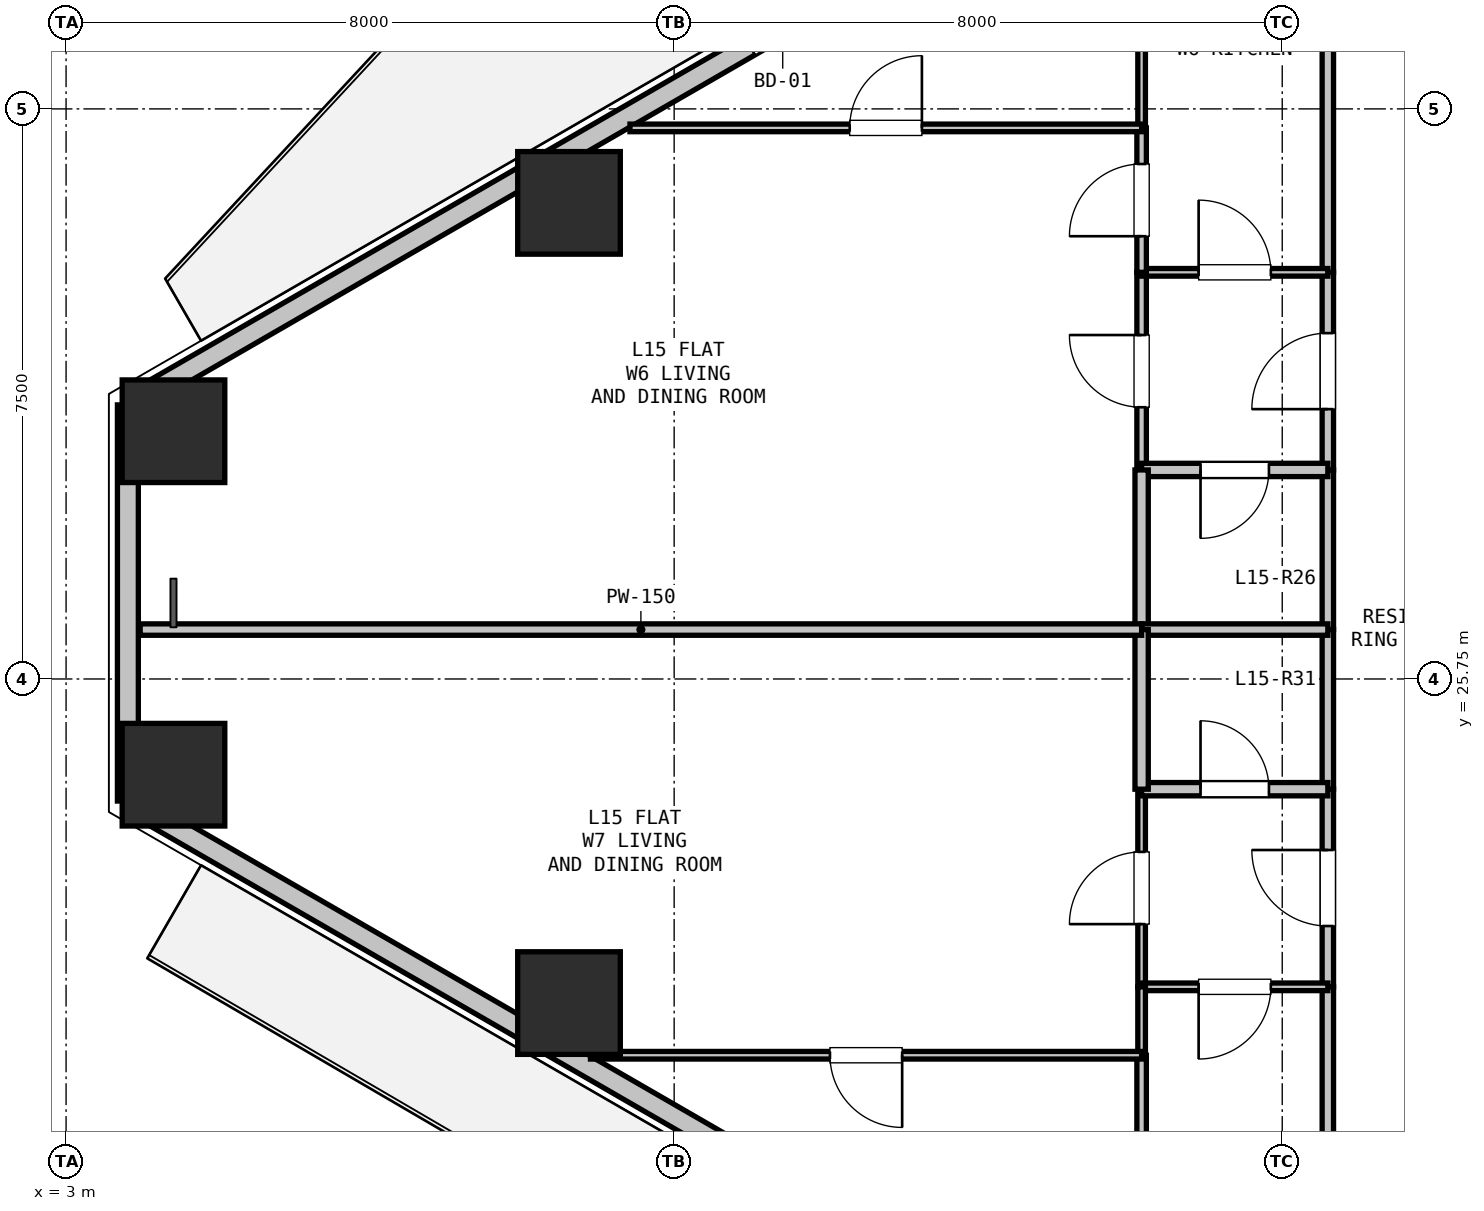
"""IFC4 building model, lengths in metres.
Left out: names, types, materials, properties, quantities, classifications, styles, units other than length and angle.
Written with IfcOpenShell. Run it as: python <this file> out.ifc"""

import sys

from ifc_helpers import new_model, si_unit, direction, frame, frame_2d, origin, origin_2d, place, context, subcontext, project, spatial, rectangle, hollow_rectangle, extrude, element, fill, save


model = new_model("IFC4")
c1 = context("Model", 3, precision=1e-05, world=origin(), true_north=direction((0.0, 1.0)))
c2 = subcontext(c1, "Body", "Model", "MODEL_VIEW")
j1 = project(units=[si_unit("LENGTHUNIT", "METRE"), si_unit("PLANEANGLEUNIT", "RADIAN")], contexts=[c1])
p1 = place(None, origin())
s1 = spatial("IfcSite", under=j1, at=p1, CompositionType="ELEMENT")
p2 = place(p1, origin())
s2 = spatial("IfcBuilding", under=s1, at=p2, CompositionType="ELEMENT")
p3 = place(p2, frame((0.0, 0.0, 55.5)))
s3 = spatial("IfcBuildingStorey", under=s2, at=p3, CompositionType="ELEMENT", Elevation=55.5)
for number, where, z_axis, x_axis in (
    (1, (4.413, 29.009, 0.0), (0.0, 0.0, 1.0), (1.0, 0.0, 0.0)),
    (2, (9.617, 32.014, 0.0), (0.0, 0.0, 1.0), (1.0, 0.0, 0.0)),
    (3, (9.617, 21.486, 0.0), (0.0, 0.0, 1.0), (1.0, 0.0, 0.0)),
    (4, (4.413, 24.491, 0.0), (0.0, 0.0, 1.0), (1.0, 0.0, 0.0)),
):
    element("IfcColumn", number, at=place(p3, frame(where, z_axis=z_axis, x_axis=x_axis)), inside=s3, PredefinedType="COLUMN", context=c2, shape_type="SweptSolid", body=[
        extrude(hollow_rectangle(XDim=1.35, YDim=1.35, WallThickness=0.036, at=origin_2d()), origin(), (0.0, 0.0, 1.0), 3.3),
    ])
p4 = place(p3, frame((3.813, 24.144, 0.0), z_axis=(0.0, 0.0, 1.0), x_axis=(0.0, 1.0, 0.0)))
e5 = element("IfcWall", 5, at=p4, inside=s3, PredefinedType="SOLIDWALL", context=c2, shape_type="SweptSolid", body=[
    extrude(rectangle(XDim=5.211, YDim=0.275, at=frame_2d((2.606, 0.0))), origin(), (0.0, 0.0, 1.0), 2.66),
])
p5 = place(p3, frame((3.943, 29.431, 0.0), z_axis=(0.0, 0.0, 1.0), x_axis=(0.866027105532, 0.499997052475, 0.0)))
e6 = element("IfcWall", 6, at=p5, inside=s3, PredefinedType="SOLIDWALL", context=c2, shape_type="SweptSolid", body=[
    extrude(rectangle(XDim=12.673, YDim=0.275, at=frame_2d((6.336, 0.0))), origin(), (0.0, 0.0, 1.0), 2.66),
])
p6 = place(p5, frame((9.298, 0.0, 0.0)))
e7 = element("IfcOpeningElement", 7, at=p6, cuts=e6, PredefinedType="OPENING", context=c2, shape_type="SweptSolid", body=[
    extrude(rectangle(XDim=1.0, YDim=2.1, at=frame_2d((0.5, 1.05))), frame((0.0, 0.147, 0.0), z_axis=(0.0, -1.0, 0.0), x_axis=(1.0, 0.0, 0.0)), (0.0, 0.0, 1.0), 0.295),
])
p7 = place(p3, frame((14.918, 17.733, 0.0), z_axis=(0.0, 0.0, 1.0), x_axis=(-0.866027105532, 0.499997052475, 0.0)))
e8 = element("IfcWall", 8, at=p7, inside=s3, PredefinedType="SOLIDWALL", context=c2, shape_type="SweptSolid", body=[
    extrude(rectangle(XDim=12.673, YDim=0.275, at=frame_2d((6.336, 0.0))), origin(), (0.0, 0.0, 1.0), 2.66),
])
p8 = place(p7, frame((2.216, 0.0, 0.9)))
e9 = element("IfcOpeningElement", 9, at=p8, cuts=e8, PredefinedType="OPENING", context=c2, shape_type="SweptSolid", body=[
    extrude(rectangle(XDim=1.2, YDim=1.4, at=frame_2d((0.6, 0.7))), frame((0.0, 0.147, 0.0), z_axis=(0.0, -1.0, 0.0), x_axis=(1.0, 0.0, 0.0)), (0.0, 0.0, 1.0), 0.295),
])
p9 = place(p3, frame((19.6, 18.15, 0.0), z_axis=(0.0, 0.0, 1.0), x_axis=(0.0, 1.0, 0.0)))
e10 = element("IfcWall", 10, at=p9, inside=s3, PredefinedType="PARTITIONING", context=c2, shape_type="SweptSolid", body=[
    extrude(rectangle(XDim=3.55, YDim=0.15, at=frame_2d((1.775, 0.0))), origin(), (0.0, 0.0, 1.0), 2.337),
])
p10 = place(p3, frame((19.6, 21.7, 0.0), z_axis=(0.0, 0.0, 1.0), x_axis=(0.0, 1.0, 0.0)))
e11 = element("IfcWall", 11, at=p10, inside=s3, PredefinedType="PARTITIONING", context=c2, shape_type="SweptSolid", body=[
    extrude(rectangle(XDim=2.6, YDim=0.15, at=frame_2d((1.3, 0.0))), origin(), (0.0, 0.0, 1.0), 3.04),
])
p11 = place(p10, frame((0.8, 0.0, 0.0)))
e12 = element("IfcOpeningElement", 12, at=p11, cuts=e11, PredefinedType="OPENING", context=c2, shape_type="SweptSolid", body=[
    extrude(rectangle(XDim=1.0, YDim=2.15, at=frame_2d((0.5, 1.075))), frame((0.0, 0.085, 0.0), z_axis=(0.0, -1.0, 0.0), x_axis=(1.0, 0.0, 0.0)), (0.0, 0.0, 1.0), 0.17),
])
p12 = place(p3, frame((19.6, 24.3, 0.0), z_axis=(0.0, 0.0, 1.0), x_axis=(0.0, 1.0, 0.0)))
e13 = element("IfcWall", 13, at=p12, inside=s3, PredefinedType="PARTITIONING", context=c2, shape_type="SweptSolid", body=[
    extrude(rectangle(XDim=2.1, YDim=0.15, at=frame_2d((1.05, 0.0))), origin(), (0.0, 0.0, 1.0), 3.04),
])
p13 = place(p3, frame((19.6, 26.4, 0.0), z_axis=(0.0, 0.0, 1.0), x_axis=(0.0, 1.0, 0.0)))
e14 = element("IfcWall", 14, at=p13, inside=s3, PredefinedType="PARTITIONING", context=c2, shape_type="SweptSolid", body=[
    extrude(rectangle(XDim=2.1, YDim=0.15, at=frame_2d((1.05, 0.0))), origin(), (0.0, 0.0, 1.0), 3.04),
])
p14 = place(p3, frame((19.6, 28.5, 0.0), z_axis=(0.0, 0.0, 1.0), x_axis=(0.0, 1.0, 0.0)))
e15 = element("IfcWall", 15, at=p14, inside=s3, PredefinedType="PARTITIONING", context=c2, shape_type="SweptSolid", body=[
    extrude(rectangle(XDim=2.6, YDim=0.15, at=frame_2d((1.3, 0.0))), origin(), (0.0, 0.0, 1.0), 3.04),
])
p15 = place(p14, frame((0.8, 0.0, 0.0)))
e16 = element("IfcOpeningElement", 16, at=p15, cuts=e15, PredefinedType="OPENING", context=c2, shape_type="SweptSolid", body=[
    extrude(rectangle(XDim=1.0, YDim=2.15, at=frame_2d((0.5, 1.075))), frame((0.0, 0.085, 0.0), z_axis=(0.0, -1.0, 0.0), x_axis=(1.0, 0.0, 0.0)), (0.0, 0.0, 1.0), 0.17),
])
p16 = place(p3, frame((19.6, 31.1, 0.0), z_axis=(0.0, 0.0, 1.0), x_axis=(0.0, 1.0, 0.0)))
e17 = element("IfcWall", 17, at=p16, inside=s3, PredefinedType="PARTITIONING", context=c2, shape_type="SweptSolid", body=[
    extrude(rectangle(XDim=4.25, YDim=0.15, at=frame_2d((2.125, 0.0))), origin(), (0.0, 0.0, 1.0), 2.337),
])
p17 = place(p3, frame((17.15, 28.5, 0.0), z_axis=(0.0, 0.0, 1.0), x_axis=(0.0, 1.0, 0.0)))
e18 = element("IfcWall", 18, at=p17, inside=s3, PredefinedType="PARTITIONING", context=c2, shape_type="SweptSolid", body=[
    extrude(rectangle(XDim=2.6, YDim=0.125, at=frame_2d((1.3, 0.0))), origin(), (0.0, 0.0, 1.0), 3.04),
])
p18 = place(p17, frame((0.825, 0.0, 0.0)))
e19 = element("IfcOpeningElement", 19, at=p18, cuts=e18, PredefinedType="OPENING", context=c2, shape_type="SweptSolid", body=[
    extrude(rectangle(XDim=0.95, YDim=2.1, at=frame_2d((0.475, 1.05))), frame((0.0, 0.073, 0.0), z_axis=(0.0, -1.0, 0.0), x_axis=(1.0, 0.0, 0.0)), (0.0, 0.0, 1.0), 0.145),
])
p19 = place(p3, frame((17.15, 31.1, 0.0), z_axis=(0.0, 0.0, 1.0), x_axis=(1.0, 0.0, 0.0)))
e20 = element("IfcWall", 20, at=p19, inside=s3, PredefinedType="PARTITIONING", context=c2, shape_type="SweptSolid", body=[
    extrude(rectangle(XDim=2.45, YDim=0.1, at=frame_2d((1.225, 0.0))), origin(), (0.0, 0.0, 1.0), 3.04),
])
p20 = place(p19, frame((0.75, 0.0, 0.0)))
e21 = element("IfcOpeningElement", 21, at=p20, cuts=e20, PredefinedType="OPENING", context=c2, shape_type="SweptSolid", body=[
    extrude(rectangle(XDim=0.95, YDim=2.1, at=frame_2d((0.475, 1.05))), frame((0.0, 0.06, 0.0), z_axis=(0.0, -1.0, 0.0), x_axis=(1.0, 0.0, 0.0)), (0.0, 0.0, 1.0), 0.12),
])
p21 = place(p3, frame((19.6, 28.5, 0.0), z_axis=(0.0, 0.0, 1.0), x_axis=(-1.0, 0.0, 0.0)))
e22 = element("IfcWall", 22, at=p21, inside=s3, PredefinedType="PLUMBINGWALL", context=c2, shape_type="SweptSolid", body=[
    extrude(rectangle(XDim=2.45, YDim=0.175, at=frame_2d((1.225, 0.0))), origin(), (0.0, 0.0, 1.0), 3.04),
])
p22 = place(p21, frame((0.775, 0.0, 0.0)))
e23 = element("IfcOpeningElement", 23, at=p22, cuts=e22, PredefinedType="OPENING", context=c2, shape_type="SweptSolid", body=[
    extrude(rectangle(XDim=0.9, YDim=2.1, at=frame_2d((0.45, 1.05))), frame((0.0, 0.097, 0.0), z_axis=(0.0, -1.0, 0.0), x_axis=(1.0, 0.0, 0.0)), (0.0, 0.0, 1.0), 0.195),
])
p23 = place(p3, frame((17.15, 21.7, 0.0), z_axis=(0.0, 0.0, 1.0), x_axis=(0.0, 1.0, 0.0)))
e24 = element("IfcWall", 24, at=p23, inside=s3, PredefinedType="PARTITIONING", context=c2, shape_type="SweptSolid", body=[
    extrude(rectangle(XDim=2.6, YDim=0.1, at=frame_2d((1.3, 0.0))), origin(), (0.0, 0.0, 1.0), 3.04),
])
p24 = place(p23, frame((0.825, 0.0, 0.0)))
e25 = element("IfcOpeningElement", 25, at=p24, cuts=e24, PredefinedType="OPENING", context=c2, shape_type="SweptSolid", body=[
    extrude(rectangle(XDim=0.95, YDim=2.1, at=frame_2d((0.475, 1.05))), frame((0.0, 0.06, 0.0), z_axis=(0.0, -1.0, 0.0), x_axis=(1.0, 0.0, 0.0)), (0.0, 0.0, 1.0), 0.12),
])
p25 = place(p3, frame((17.15, 24.3, 0.0), z_axis=(0.0, 0.0, 1.0), x_axis=(1.0, 0.0, 0.0)))
e26 = element("IfcWall", 26, at=p25, inside=s3, PredefinedType="PLUMBINGWALL", context=c2, shape_type="SweptSolid", body=[
    extrude(rectangle(XDim=2.45, YDim=0.175, at=frame_2d((1.225, 0.0))), origin(), (0.0, 0.0, 1.0), 3.04),
])
p26 = place(p25, frame((0.775, 0.0, 0.0)))
e27 = element("IfcOpeningElement", 27, at=p26, cuts=e26, PredefinedType="OPENING", context=c2, shape_type="SweptSolid", body=[
    extrude(rectangle(XDim=0.9, YDim=2.1, at=frame_2d((0.45, 1.05))), frame((0.0, 0.097, 0.0), z_axis=(0.0, -1.0, 0.0), x_axis=(1.0, 0.0, 0.0)), (0.0, 0.0, 1.0), 0.195),
])
p27 = place(p3, frame((19.6, 21.7, 0.0), z_axis=(0.0, 0.0, 1.0), x_axis=(-1.0, 0.0, 0.0)))
e28 = element("IfcWall", 28, at=p27, inside=s3, PredefinedType="PARTITIONING", context=c2, shape_type="SweptSolid", body=[
    extrude(rectangle(XDim=2.45, YDim=0.1, at=frame_2d((1.225, 0.0))), origin(), (0.0, 0.0, 1.0), 2.337),
])
p28 = place(p27, frame((0.75, 0.0, 0.0)))
e29 = element("IfcOpeningElement", 29, at=p28, cuts=e28, PredefinedType="OPENING", context=c2, shape_type="SweptSolid", body=[
    extrude(rectangle(XDim=0.95, YDim=2.1, at=frame_2d((0.475, 1.05))), frame((0.0, 0.06, 0.0), z_axis=(0.0, -1.0, 0.0), x_axis=(1.0, 0.0, 0.0)), (0.0, 0.0, 1.0), 0.12),
])
p29 = place(p3, frame((17.15, 26.4, 0.0), z_axis=(0.0, 0.0, 1.0), x_axis=(0.0, 1.0, 0.0)))
e30 = element("IfcWall", 30, at=p29, inside=s3, PredefinedType="PLUMBINGWALL", context=c2, shape_type="SweptSolid", body=[
    extrude(rectangle(XDim=2.1, YDim=0.175, at=frame_2d((1.05, 0.0))), origin(), (0.0, 0.0, 1.0), 3.04),
])
p30 = place(p3, frame((19.6, 26.4, 0.0), z_axis=(0.0, 0.0, 1.0), x_axis=(-1.0, 0.0, 0.0)))
e31 = element("IfcWall", 31, at=p30, inside=s3, PredefinedType="PARTITIONING", context=c2, shape_type="SweptSolid", body=[
    extrude(rectangle(XDim=2.45, YDim=0.15, at=frame_2d((1.225, 0.0))), origin(), (0.0, 0.0, 1.0), 3.04),
])
p31 = place(p3, frame((17.15, 31.1, 0.0), z_axis=(0.0, 0.0, 1.0), x_axis=(0.0, 1.0, 0.0)))
e32 = element("IfcWall", 32, at=p31, inside=s3, PredefinedType="PARTITIONING", context=c2, shape_type="SweptSolid", body=[
    extrude(rectangle(XDim=1.9, YDim=0.125, at=frame_2d((0.95, 0.0))), origin(), (0.0, 0.0, 1.0), 2.337),
])
p32 = place(p31, frame((0.475, 0.0, 0.0)))
e33 = element("IfcOpeningElement", 33, at=p32, cuts=e32, PredefinedType="OPENING", context=c2, shape_type="SweptSolid", body=[
    extrude(rectangle(XDim=0.95, YDim=2.1, at=frame_2d((0.475, 1.05))), frame((0.0, 0.073, 0.0), z_axis=(0.0, -1.0, 0.0), x_axis=(1.0, 0.0, 0.0)), (0.0, 0.0, 1.0), 0.145),
])
p33 = place(p3, frame((17.15, 33.0, 0.0), z_axis=(0.0, 0.0, 1.0), x_axis=(0.0, 1.0, 0.0)))
e34 = element("IfcWall", 34, at=p33, inside=s3, PredefinedType="PARTITIONING", context=c2, shape_type="SweptSolid", body=[
    extrude(rectangle(XDim=2.35, YDim=0.1, at=frame_2d((1.175, 0.0))), origin(), (0.0, 0.0, 1.0), 3.04),
])
p34 = place(p3, frame((17.15, 24.3, 0.0), z_axis=(0.0, 0.0, 1.0), x_axis=(0.0, 1.0, 0.0)))
e35 = element("IfcWall", 35, at=p34, inside=s3, PredefinedType="PLUMBINGWALL", context=c2, shape_type="SweptSolid", body=[
    extrude(rectangle(XDim=2.1, YDim=0.175, at=frame_2d((1.05, 0.0))), origin(), (0.0, 0.0, 1.0), 3.04),
])
p35 = place(p3, frame((17.15, 18.15, 0.0), z_axis=(0.0, 0.0, 1.0), x_axis=(0.0, 1.0, 0.0)))
e36 = element("IfcWall", 36, at=p35, inside=s3, PredefinedType="PARTITIONING", context=c2, shape_type="SweptSolid", body=[
    extrude(rectangle(XDim=2.65, YDim=0.125, at=frame_2d((1.325, 0.0))), origin(), (0.0, 0.0, 1.0), 3.04),
])
p36 = place(p3, frame((17.15, 20.8, 0.0), z_axis=(0.0, 0.0, 1.0), x_axis=(0.0, 1.0, 0.0)))
e37 = element("IfcWall", 37, at=p36, inside=s3, PredefinedType="PARTITIONING", context=c2, shape_type="SweptSolid", body=[
    extrude(rectangle(XDim=0.9, YDim=0.1, at=frame_2d((0.45, 0.0))), origin(), (0.0, 0.0, 1.0), 2.337),
])
p37 = place(p3, frame((10.419, 33.0, 0.0), z_axis=(0.0, 0.0, 1.0), x_axis=(1.0, 0.0, 0.0)))
e38 = element("IfcWall", 38, at=p37, inside=s3, PredefinedType="PARTITIONING", context=c2, shape_type="SweptSolid", body=[
    extrude(rectangle(XDim=6.731, YDim=0.1, at=frame_2d((3.365, 0.0))), origin(), (0.0, 0.0, 1.0), 2.365),
])
p38 = place(p37, frame((2.89, 0.0, 0.0)))
e39 = element("IfcOpeningElement", 39, at=p38, cuts=e38, PredefinedType="OPENING", context=c2, shape_type="SweptSolid", body=[
    extrude(rectangle(XDim=0.95, YDim=2.1, at=frame_2d((0.475, 1.05))), frame((0.0, 0.06, 0.0), z_axis=(0.0, -1.0, 0.0), x_axis=(1.0, 0.0, 0.0)), (0.0, 0.0, 1.0), 0.12),
])
p39 = place(p3, frame((17.15, 26.4, 0.0), z_axis=(0.0, 0.0, 1.0), x_axis=(-1.0, 0.0, 0.0)))
e40 = element("IfcWall", 40, at=p39, inside=s3, PredefinedType="PARTITIONING", context=c2, shape_type="SweptSolid", body=[
    extrude(rectangle(XDim=13.175, YDim=0.15, at=frame_2d((6.588, 0.0))), origin(), (0.0, 0.0, 1.0), 2.65),
])
p40 = place(p3, frame((3.813, 29.356, 0.0), z_axis=(0.0, 0.0, 1.0), x_axis=(0.866131372301, 0.499816412211, 0.0)))
e41 = element("IfcWall", 41, at=p40, inside=s3, PredefinedType="PARTITIONING", context=c2, shape_type="SweptSolid", body=[
    extrude(rectangle(XDim=0.15, YDim=0.1, at=frame_2d((0.075, 0.0))), origin(), (0.0, 0.0, 1.0), 3.04),
])
p41 = place(p3, frame((17.15, 20.8, 0.0), z_axis=(0.0, 0.0, 1.0), x_axis=(-1.0, 0.0, 0.0)))
e42 = element("IfcWall", 42, at=p41, inside=s3, PredefinedType="PARTITIONING", context=c2, shape_type="SweptSolid", body=[
    extrude(rectangle(XDim=7.25, YDim=0.1, at=frame_2d((3.625, 0.0))), origin(), (0.0, 0.0, 1.0), 2.365),
])
p42 = place(p41, frame((3.15, 0.0, 0.0)))
e43 = element("IfcOpeningElement", 43, at=p42, cuts=e42, PredefinedType="OPENING", context=c2, shape_type="SweptSolid", body=[
    extrude(rectangle(XDim=0.95, YDim=2.1, at=frame_2d((0.475, 1.05))), frame((0.0, 0.06, 0.0), z_axis=(0.0, -1.0, 0.0), x_axis=(1.0, 0.0, 0.0)), (0.0, 0.0, 1.0), 0.12),
])
p43 = place(p3, frame((3.943, 24.069, 0.0), z_axis=(0.0, 0.0, 1.0), x_axis=(-0.866131372301, 0.499816412211, 0.0)))
e44 = element("IfcWall", 44, at=p43, inside=s3, PredefinedType="PARTITIONING", context=c2, shape_type="SweptSolid", body=[
    extrude(rectangle(XDim=0.15, YDim=0.125, at=frame_2d((0.075, 0.0))), origin(), (0.0, 0.0, 1.0), 3.04),
])
p44 = place(p15, origin())
e45 = element("IfcDoor", 45, at=p44, inside=s3, OperationType="SINGLE_SWING_LEFT", PredefinedType="DOOR", context=c2, shape_type="SweptSolid", body=[
    extrude(rectangle(XDim=1.0, YDim=2.15, at=frame_2d((0.5, 1.075))), frame((0.0, 0.025, 0.0), z_axis=(0.0, -1.0, 0.0), x_axis=(1.0, 0.0, 0.0)), (0.0, 0.0, 1.0), 0.05),
])
fill(e16, e45)
p45 = place(p11, origin())
e46 = element("IfcDoor", 46, at=p45, inside=s3, OperationType="SINGLE_SWING_RIGHT", PredefinedType="DOOR", context=c2, shape_type="SweptSolid", body=[
    extrude(rectangle(XDim=1.0, YDim=2.15, at=frame_2d((0.5, 1.075))), frame((0.0, 0.025, 0.0), z_axis=(0.0, -1.0, 0.0), x_axis=(1.0, 0.0, 0.0)), (0.0, 0.0, 1.0), 0.05),
])
fill(e12, e46)
p46 = place(p22, origin())
e47 = element("IfcDoor", 47, at=p46, inside=s3, OperationType="SINGLE_SWING_RIGHT", PredefinedType="DOOR", context=c2, shape_type="SweptSolid", body=[
    extrude(rectangle(XDim=0.9, YDim=2.1, at=frame_2d((0.45, 1.05))), frame((0.0, 0.025, 0.0), z_axis=(0.0, -1.0, 0.0), x_axis=(1.0, 0.0, 0.0)), (0.0, 0.0, 1.0), 0.05),
])
fill(e23, e47)
p47 = place(p20, origin())
e48 = element("IfcDoor", 48, at=p47, inside=s3, OperationType="SINGLE_SWING_LEFT", PredefinedType="DOOR", context=c2, shape_type="SweptSolid", body=[
    extrude(rectangle(XDim=0.95, YDim=2.1, at=frame_2d((0.475, 1.05))), frame((0.0, 0.025, 0.0), z_axis=(0.0, -1.0, 0.0), x_axis=(1.0, 0.0, 0.0)), (0.0, 0.0, 1.0), 0.05),
])
fill(e21, e48)
p48 = place(p18, origin())
e49 = element("IfcDoor", 49, at=p48, inside=s3, OperationType="SINGLE_SWING_RIGHT", PredefinedType="DOOR", context=c2, shape_type="SweptSolid", body=[
    extrude(rectangle(XDim=0.95, YDim=2.1, at=frame_2d((0.475, 1.05))), frame((0.0, 0.025, 0.0), z_axis=(0.0, -1.0, 0.0), x_axis=(1.0, 0.0, 0.0)), (0.0, 0.0, 1.0), 0.05),
])
fill(e19, e49)
p49 = place(p26, origin())
e50 = element("IfcDoor", 50, at=p49, inside=s3, OperationType="SINGLE_SWING_LEFT", PredefinedType="DOOR", context=c2, shape_type="SweptSolid", body=[
    extrude(rectangle(XDim=0.9, YDim=2.1, at=frame_2d((0.45, 1.05))), frame((0.0, 0.025, 0.0), z_axis=(0.0, -1.0, 0.0), x_axis=(1.0, 0.0, 0.0)), (0.0, 0.0, 1.0), 0.05),
])
fill(e27, e50)
p50 = place(p28, origin())
e51 = element("IfcDoor", 51, at=p50, inside=s3, OperationType="SINGLE_SWING_RIGHT", PredefinedType="DOOR", context=c2, shape_type="SweptSolid", body=[
    extrude(rectangle(XDim=0.95, YDim=2.1, at=frame_2d((0.475, 1.05))), frame((0.0, 0.025, 0.0), z_axis=(0.0, -1.0, 0.0), x_axis=(1.0, 0.0, 0.0)), (0.0, 0.0, 1.0), 0.05),
])
fill(e29, e51)
p51 = place(p24, origin())
e52 = element("IfcDoor", 52, at=p51, inside=s3, OperationType="SINGLE_SWING_LEFT", PredefinedType="DOOR", context=c2, shape_type="SweptSolid", body=[
    extrude(rectangle(XDim=0.95, YDim=2.1, at=frame_2d((0.475, 1.05))), frame((0.0, 0.025, 0.0), z_axis=(0.0, -1.0, 0.0), x_axis=(1.0, 0.0, 0.0)), (0.0, 0.0, 1.0), 0.05),
])
fill(e25, e52)
p52 = place(p32, origin())
e53 = element("IfcDoor", 53, at=p52, inside=s3, OperationType="SINGLE_SWING_LEFT", PredefinedType="DOOR", context=c2, shape_type="SweptSolid", body=[
    extrude(rectangle(XDim=0.95, YDim=2.1, at=frame_2d((0.475, 1.05))), frame((0.0, 0.025, 0.0), z_axis=(0.0, -1.0, 0.0), x_axis=(1.0, 0.0, 0.0)), (0.0, 0.0, 1.0), 0.05),
])
fill(e33, e53)
p53 = place(p38, origin())
e54 = element("IfcDoor", 54, at=p53, inside=s3, OperationType="SINGLE_SWING_RIGHT", PredefinedType="DOOR", context=c2, shape_type="SweptSolid", body=[
    extrude(rectangle(XDim=0.95, YDim=2.1, at=frame_2d((0.475, 1.05))), frame((0.0, 0.025, 0.0), z_axis=(0.0, -1.0, 0.0), x_axis=(1.0, 0.0, 0.0)), (0.0, 0.0, 1.0), 0.05),
])
fill(e39, e54)
p54 = place(p42, origin())
e55 = element("IfcDoor", 55, at=p54, inside=s3, OperationType="SINGLE_SWING_LEFT", PredefinedType="DOOR", context=c2, shape_type="SweptSolid", body=[
    extrude(rectangle(XDim=0.95, YDim=2.1, at=frame_2d((0.475, 1.05))), frame((0.0, 0.025, 0.0), z_axis=(0.0, -1.0, 0.0), x_axis=(1.0, 0.0, 0.0)), (0.0, 0.0, 1.0), 0.05),
])
fill(e43, e55)
save(model, sys.argv[1])
